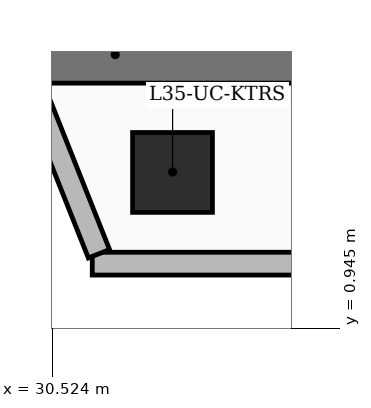
"""IFC4 building model, lengths in metres.
Left out: names, types, materials, properties, quantities, classifications, styles, units other than length and angle.
Written with IfcOpenShell. Run it as: python <this file> out.ifc"""

import sys

from ifc_helpers import new_model, si_unit, direction, frame, frame_2d, origin, origin_2d, place, context, subcontext, project, spatial, rectangle, extrude, element, save


model = new_model("IFC4")
c1 = context("Model", 3, precision=1e-05, world=origin(), true_north=direction((0.0, 1.0)))
c2 = subcontext(c1, "Body", "Model", "MODEL_VIEW")
j1 = project(units=[si_unit("LENGTHUNIT", "METRE"), si_unit("PLANEANGLEUNIT", "RADIAN")], contexts=[c1])
p1 = place(None, origin())
s1 = spatial("IfcSite", under=j1, at=p1, CompositionType="ELEMENT")
p2 = place(p1, origin())
s2 = spatial("IfcBuilding", under=s1, at=p2, CompositionType="ELEMENT")
p3 = place(p2, frame((0.0, 0.0, 139.2)))
s3 = spatial("IfcBuildingStorey", under=s2, at=p3, CompositionType="ELEMENT", Elevation=139.2)
p4 = place(p3, frame((28.15, 4.55, 0.0), z_axis=(0.0, 0.0, 1.0), x_axis=(1.0, 0.0, 0.0)))
e1 = element("IfcWall", 1, at=p4, inside=s3, PredefinedType="SHEAR", context=c2, shape_type="SweptSolid", body=[
    extrude(rectangle(XDim=6.4, YDim=0.75, at=frame_2d((3.2, 0.0))), origin(), (0.0, 0.0, 1.0), 3.6),
])
p5 = place(p3, frame((32.104, 3.0, 0.0), z_axis=(0.0, 0.0, 1.0), x_axis=(1.0, 0.0, 0.0)))
e2 = element("IfcColumn", 2, at=p5, inside=s3, PredefinedType="COLUMN", context=c2, shape_type="SweptSolid", body=[
    extrude(rectangle(XDim=1.05, YDim=1.05, at=origin_2d()), origin(), (0.0, 0.0, 1.0), 3.6),
])
p6 = place(p3, frame((37.771, 1.8, 0.0), z_axis=(0.0, 0.0, 1.0), x_axis=(-1.0, 0.0, 0.0)))
e3 = element("IfcWall", 3, at=p6, inside=s3, PredefinedType="SOLIDWALL", context=c2, shape_type="SweptSolid", body=[
    extrude(rectangle(XDim=6.723, YDim=0.3, at=frame_2d((3.361, 0.0))), origin(), (0.0, 0.0, 1.0), 3.35),
])
p7 = place(p6, frame((1.9, 0.0, 0.6)))
e4 = element("IfcOpeningElement", 4, at=p7, cuts=e3, PredefinedType="OPENING", context=c2, shape_type="SweptSolid", body=[
    extrude(rectangle(XDim=1.5, YDim=2.1, at=frame_2d((0.75, 1.05))), frame((0.0, 0.16, 0.0), z_axis=(0.0, -1.0, 0.0), x_axis=(1.0, 0.0, 0.0)), (0.0, 0.0, 1.0), 0.32),
])
p8 = place(p3, frame((31.136, 1.93, 0.0), z_axis=(0.0, 0.0, 1.0), x_axis=(-0.369562555971, 0.929205852986, 0.0)))
e5 = element("IfcWall", 5, at=p8, inside=s3, PredefinedType="SOLIDWALL", context=c2, shape_type="SweptSolid", body=[
    extrude(rectangle(XDim=2.442, YDim=0.3, at=frame_2d((1.221, 0.0))), origin(), (0.0, 0.0, 1.0), 2.575),
])
save(model, sys.argv[1])
